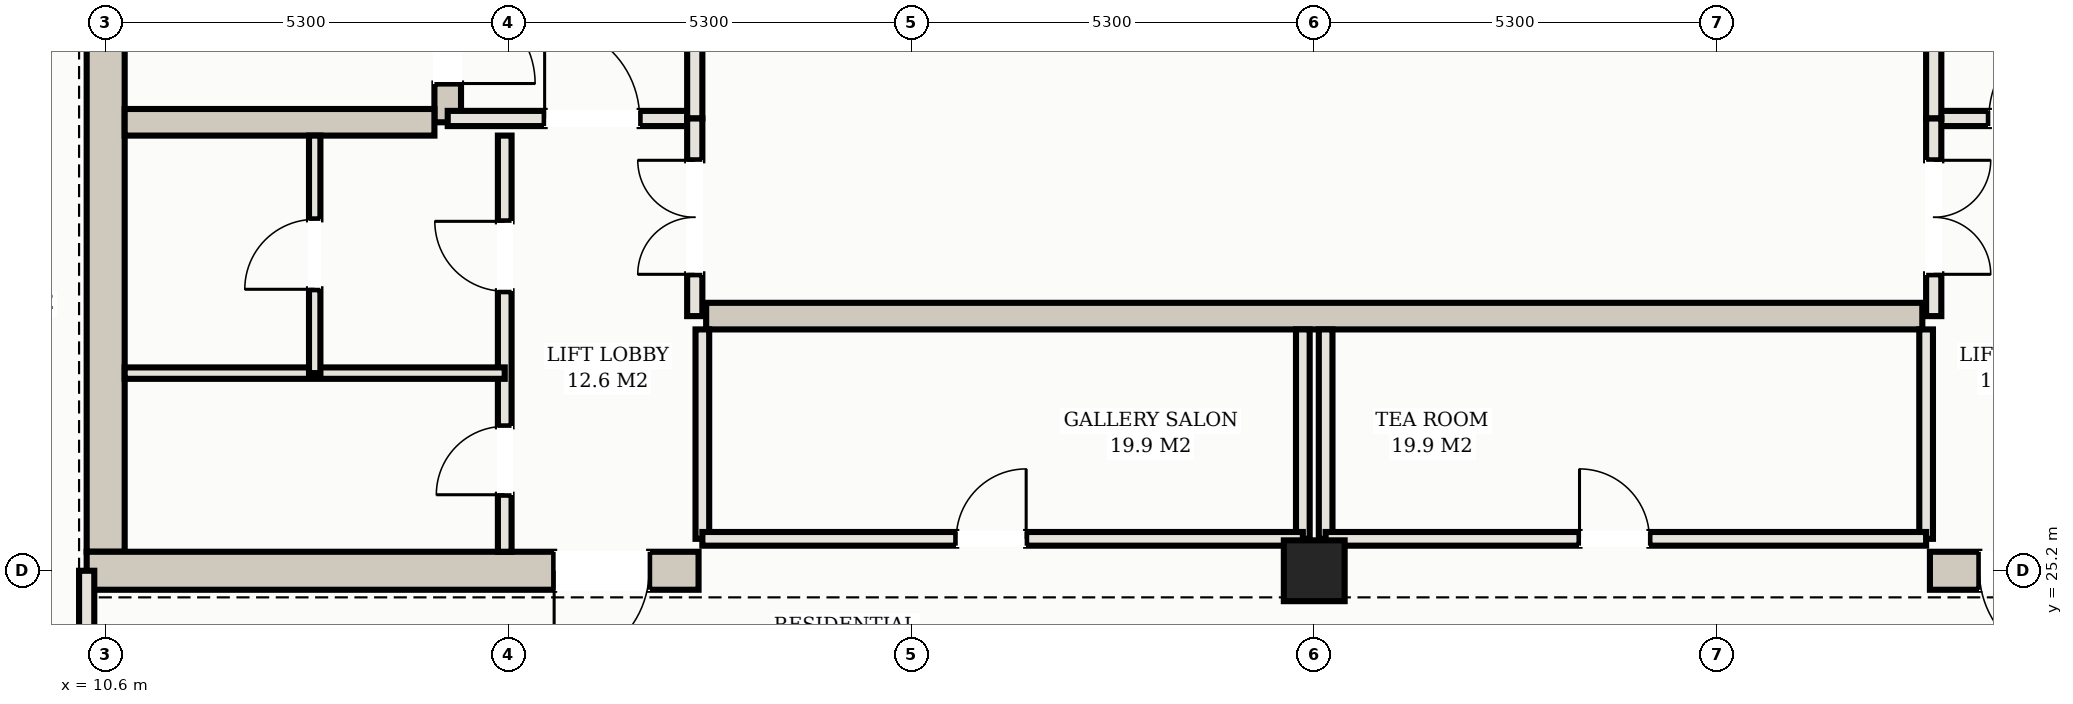
"""IFC4 building model, lengths in metres.
Left out: names, types, materials, properties, quantities, classifications, styles, units other than length and angle.
Written with IfcOpenShell. Run it as: python <this file> out.ifc"""

import sys

from ifc_helpers import new_model, si_unit, direction, frame, frame_2d, origin, origin_2d, place, context, subcontext, project, spatial, rectangle, hollow_rectangle, extrude, element, fill, save


model = new_model("IFC4")
c1 = context("Model", 3, precision=1e-05, world=origin(), true_north=direction((0.0, 1.0)))
c2 = subcontext(c1, "Body", "Model", "MODEL_VIEW")
j1 = project(units=[si_unit("LENGTHUNIT", "METRE"), si_unit("PLANEANGLEUNIT", "RADIAN")], contexts=[c1])
p1 = place(None, origin())
s1 = spatial("IfcSite", under=j1, at=p1, CompositionType="ELEMENT")
p2 = place(p1, origin())
s2 = spatial("IfcBuilding", under=s1, at=p2, CompositionType="ELEMENT")
p3 = place(p2, frame((0.0, 0.0, 200.0)))
s3 = spatial("IfcBuildingStorey", under=s2, at=p3, CompositionType="ELEMENT", Elevation=200.0)
p4 = place(p3, frame((10.6, 25.45, 0.0), z_axis=(0.0, 0.0, 1.0), x_axis=(0.0, 1.0, 0.0)))
e1 = element("IfcWall", 1, at=p4, inside=s3, PredefinedType="SHEAR", context=c2, shape_type="SweptSolid", body=[
    extrude(rectangle(XDim=14.3, YDim=0.5, at=frame_2d((7.15, 0.0))), origin(), (0.0, 0.0, 1.0), 3.11),
])
p5 = place(p3, frame((10.35, 25.2, 0.0), z_axis=(0.0, 0.0, 1.0), x_axis=(1.0, 0.0, 0.0)))
e2 = element("IfcWall", 2, at=p5, inside=s3, PredefinedType="SHEAR", context=c2, shape_type="SweptSolid", body=[
    extrude(rectangle(XDim=8.05, YDim=0.5, at=frame_2d((4.025, 0.0))), origin(), (0.0, 0.0, 1.0), 3.11),
])
p6 = place(p5, frame((6.15, 0.0, 0.0)))
e3 = element("IfcOpeningElement", 3, at=p6, cuts=e2, PredefinedType="OPENING", context=c2, shape_type="SweptSolid", body=[
    extrude(rectangle(XDim=1.25, YDim=2.2, at=frame_2d((0.625, 1.1))), frame((0.0, 0.26, 0.0), z_axis=(0.0, -1.0, 0.0), x_axis=(1.0, 0.0, 0.0)), (0.0, 0.0, 1.0), 0.52),
])
p7 = place(p3, frame((34.6, 25.2, 0.0), z_axis=(0.0, 0.0, 1.0), x_axis=(1.0, 0.0, 0.0)))
e4 = element("IfcWall", 4, at=p7, inside=s3, PredefinedType="SHEAR", context=c2, shape_type="SweptSolid", body=[
    extrude(rectangle(XDim=8.05, YDim=0.5, at=frame_2d((4.025, 0.0))), origin(), (0.0, 0.0, 1.0), 3.11),
])
p8 = place(p7, frame((0.65, 0.0, 0.0)))
e5 = element("IfcOpeningElement", 5, at=p8, cuts=e4, PredefinedType="OPENING", context=c2, shape_type="SweptSolid", body=[
    extrude(rectangle(XDim=1.25, YDim=2.2, at=frame_2d((0.625, 1.1))), frame((0.0, 0.26, 0.0), z_axis=(0.0, -1.0, 0.0), x_axis=(1.0, 0.0, 0.0)), (0.0, 0.0, 1.0), 0.52),
])
p9 = place(p3, frame((15.1, 31.1, 0.0), z_axis=(0.0, 0.0, 1.0), x_axis=(0.0, 1.0, 0.0)))
e6 = element("IfcWall", 6, at=p9, inside=s3, PredefinedType="SHEAR", context=c2, shape_type="SweptSolid", body=[
    extrude(rectangle(XDim=8.65, YDim=0.35, at=frame_2d((4.325, 0.0))), origin(), (0.0, 0.0, 1.0), 3.11),
])
p10 = place(p9, frame((0.51, 0.0, 0.0)))
e7 = element("IfcOpeningElement", 7, at=p10, cuts=e6, PredefinedType="OPENING", context=c2, shape_type="SweptSolid", body=[
    extrude(rectangle(XDim=1.15, YDim=2.2, at=frame_2d((0.575, 1.1))), frame((0.0, 0.185, 0.0), z_axis=(0.0, -1.0, 0.0), x_axis=(1.0, 0.0, 0.0)), (0.0, 0.0, 1.0), 0.37),
])
p11 = place(p3, frame((10.85, 31.1, 0.0), z_axis=(0.0, 0.0, 1.0), x_axis=(1.0, 0.0, 0.0)))
e8 = element("IfcWall", 8, at=p11, inside=s3, PredefinedType="SHEAR", context=c2, shape_type="SweptSolid", body=[
    extrude(rectangle(XDim=4.075, YDim=0.35, at=frame_2d((2.038, 0.0))), origin(), (0.0, 0.0, 1.0), 3.11),
])
p12 = place(p3, frame((18.5, 28.55, 0.0), z_axis=(0.0, 0.0, 1.0), x_axis=(1.0, 0.0, 0.0)))
e9 = element("IfcWall", 9, at=p12, inside=s3, PredefinedType="SHEAR", context=c2, shape_type="SweptSolid", body=[
    extrude(rectangle(XDim=16.0, YDim=0.35, at=frame_2d((8.0, 0.0))), origin(), (0.0, 0.0, 1.0), 3.11),
])
p13 = place(p3, frame((26.5, 25.2, 0.0), z_axis=(0.0, 0.0, 1.0), x_axis=(1.0, 0.0, 0.0)))
e10 = element("IfcColumn", 10, at=p13, inside=s3, PredefinedType="COLUMN", context=c2, shape_type="SweptSolid", body=[
    extrude(hollow_rectangle(XDim=0.8, YDim=0.8, WallThickness=0.028, at=origin_2d()), origin(), (0.0, 0.0, 1.0), 3.3),
])
p14 = place(p3, frame((15.1, 31.15, 0.0), z_axis=(0.0, 0.0, 1.0), x_axis=(1.0, 0.0, 0.0)))
e11 = element("IfcWall", 11, at=p14, inside=s3, PredefinedType="PARTITIONING", context=c2, shape_type="SweptSolid", body=[
    extrude(rectangle(XDim=3.25, YDim=0.2, at=frame_2d((1.625, 0.0))), origin(), (0.0, 0.0, 1.0), 2.43),
])
p15 = place(p14, frame((1.275, 0.0, 0.0)))
e12 = element("IfcOpeningElement", 12, at=p15, cuts=e11, PredefinedType="OPENING", context=c2, shape_type="SweptSolid", body=[
    extrude(rectangle(XDim=1.25, YDim=2.2, at=frame_2d((0.625, 1.1))), frame((0.0, 0.11, 0.0), z_axis=(0.0, -1.0, 0.0), x_axis=(1.0, 0.0, 0.0)), (0.0, 0.0, 1.0), 0.22),
])
p16 = place(p3, frame((18.35, 31.15, 0.0), z_axis=(0.0, 0.0, 1.0), x_axis=(0.0, 1.0, 0.0)))
e13 = element("IfcWall", 13, at=p16, inside=s3, PredefinedType="PARTITIONING", context=c2, shape_type="SweptSolid", body=[
    extrude(rectangle(XDim=5.15, YDim=0.2, at=frame_2d((2.575, 0.0))), origin(), (0.0, 0.0, 1.0), 2.43),
])
p17 = place(p16, frame((1.875, 0.0, 0.0)))
e14 = element("IfcOpeningElement", 14, at=p17, cuts=e13, PredefinedType="OPENING", context=c2, shape_type="SweptSolid", body=[
    extrude(rectangle(XDim=1.25, YDim=2.2, at=frame_2d((0.625, 1.1))), frame((0.0, 0.11, 0.0), z_axis=(0.0, -1.0, 0.0), x_axis=(1.0, 0.0, 0.0)), (0.0, 0.0, 1.0), 0.22),
])
p18 = place(p3, frame((34.65, 31.15, 0.0), z_axis=(0.0, 0.0, 1.0), x_axis=(1.0, 0.0, 0.0)))
e15 = element("IfcWall", 15, at=p18, inside=s3, PredefinedType="PARTITIONING", context=c2, shape_type="SweptSolid", body=[
    extrude(rectangle(XDim=3.25, YDim=0.2, at=frame_2d((1.625, 0.0))), origin(), (0.0, 0.0, 1.0), 2.43),
])
p19 = place(p18, frame((0.725, 0.0, 0.0)))
e16 = element("IfcOpeningElement", 16, at=p19, cuts=e15, PredefinedType="OPENING", context=c2, shape_type="SweptSolid", body=[
    extrude(rectangle(XDim=1.25, YDim=2.2, at=frame_2d((0.625, 1.1))), frame((0.0, 0.11, 0.0), z_axis=(0.0, -1.0, 0.0), x_axis=(1.0, 0.0, 0.0)), (0.0, 0.0, 1.0), 0.22),
])
p20 = place(p3, frame((34.65, 31.15, 0.0), z_axis=(0.0, 0.0, 1.0), x_axis=(0.0, 1.0, 0.0)))
e17 = element("IfcWall", 17, at=p20, inside=s3, PredefinedType="PARTITIONING", context=c2, shape_type="SweptSolid", body=[
    extrude(rectangle(XDim=5.15, YDim=0.2, at=frame_2d((2.575, 0.0))), origin(), (0.0, 0.0, 1.0), 2.43),
])
p21 = place(p20, frame((1.875, 0.0, 0.0)))
e18 = element("IfcOpeningElement", 18, at=p21, cuts=e17, PredefinedType="OPENING", context=c2, shape_type="SweptSolid", body=[
    extrude(rectangle(XDim=1.25, YDim=2.2, at=frame_2d((0.625, 1.1))), frame((0.0, 0.11, 0.0), z_axis=(0.0, -1.0, 0.0), x_axis=(1.0, 0.0, 0.0)), (0.0, 0.0, 1.0), 0.22),
])
p22 = place(p3, frame((15.85, 25.45, 0.0), z_axis=(0.0, 0.0, 1.0), x_axis=(0.0, 1.0, 0.0)))
e19 = element("IfcWall", 19, at=p22, inside=s3, PredefinedType="PARTITIONING", context=c2, shape_type="SweptSolid", body=[
    extrude(rectangle(XDim=5.475, YDim=0.18, at=frame_2d((2.738, 0.0))), origin(), (0.0, 0.0, 1.0), 2.43),
])
p23 = place(p22, frame((0.75, 0.0, 0.0)))
e20 = element("IfcOpeningElement", 20, at=p23, cuts=e19, PredefinedType="OPENING", context=c2, shape_type="SweptSolid", body=[
    extrude(rectangle(XDim=0.9, YDim=2.15, at=frame_2d((0.45, 1.075))), frame((0.0, 0.1, 0.0), z_axis=(0.0, -1.0, 0.0), x_axis=(1.0, 0.0, 0.0)), (0.0, 0.0, 1.0), 0.2),
])
p24 = place(p22, frame((3.427, 0.0, 0.0)))
e21 = element("IfcOpeningElement", 21, at=p24, cuts=e19, PredefinedType="OPENING", context=c2, shape_type="SweptSolid", body=[
    extrude(rectangle(XDim=0.92, YDim=2.15, at=frame_2d((0.46, 1.075))), frame((0.0, 0.1, 0.0), z_axis=(0.0, -1.0, 0.0), x_axis=(1.0, 0.0, 0.0)), (0.0, 0.0, 1.0), 0.2),
])
p25 = place(p3, frame((10.85, 27.8, 0.0), z_axis=(0.0, 0.0, 1.0), x_axis=(1.0, 0.0, 0.0)))
e22 = element("IfcWall", 22, at=p25, inside=s3, PredefinedType="PARTITIONING", context=c2, shape_type="SweptSolid", body=[
    extrude(rectangle(XDim=5.0, YDim=0.15, at=frame_2d((2.5, 0.0))), origin(), (0.0, 0.0, 1.0), 2.43),
])
p26 = place(p3, frame((13.35, 27.8, 0.0), z_axis=(0.0, 0.0, 1.0), x_axis=(0.0, 1.0, 0.0)))
e23 = element("IfcWall", 23, at=p26, inside=s3, PredefinedType="PARTITIONING", context=c2, shape_type="SweptSolid", body=[
    extrude(rectangle(XDim=3.125, YDim=0.15, at=frame_2d((1.562, 0.0))), origin(), (0.0, 0.0, 1.0), 2.43),
])
p27 = place(p26, frame((1.103, 0.0, 0.0)))
e24 = element("IfcOpeningElement", 24, at=p27, cuts=e23, PredefinedType="OPENING", context=c2, shape_type="SweptSolid", body=[
    extrude(rectangle(XDim=0.92, YDim=2.15, at=frame_2d((0.46, 1.075))), frame((0.0, 0.085, 0.0), z_axis=(0.0, -1.0, 0.0), x_axis=(1.0, 0.0, 0.0)), (0.0, 0.0, 1.0), 0.17),
])
p28 = place(p3, frame((18.35, 28.55, 0.0), z_axis=(0.0, 0.0, 1.0), x_axis=(0.0, 1.0, 0.0)))
e25 = element("IfcWall", 25, at=p28, inside=s3, PredefinedType="PARTITIONING", context=c2, shape_type="SweptSolid", body=[
    extrude(rectangle(XDim=2.6, YDim=0.2, at=frame_2d((1.3, 0.0))), origin(), (0.0, 0.0, 1.0), 2.43),
])
p29 = place(p28, frame((0.55, 0.0, 0.0)))
e26 = element("IfcOpeningElement", 26, at=p29, cuts=e25, PredefinedType="OPENING", context=c2, shape_type="SweptSolid", body=[
    extrude(rectangle(XDim=1.5, YDim=2.25, at=frame_2d((0.75, 1.125))), frame((0.0, 0.11, 0.0), z_axis=(0.0, -1.0, 0.0), x_axis=(1.0, 0.0, 0.0)), (0.0, 0.0, 1.0), 0.22),
])
p30 = place(p3, frame((34.65, 28.55, 0.0), z_axis=(0.0, 0.0, 1.0), x_axis=(0.0, 1.0, 0.0)))
e27 = element("IfcWall", 27, at=p30, inside=s3, PredefinedType="PARTITIONING", context=c2, shape_type="SweptSolid", body=[
    extrude(rectangle(XDim=2.6, YDim=0.2, at=frame_2d((1.3, 0.0))), origin(), (0.0, 0.0, 1.0), 2.43),
])
p31 = place(p30, frame((0.55, 0.0, 0.0)))
e28 = element("IfcOpeningElement", 28, at=p31, cuts=e27, PredefinedType="OPENING", context=c2, shape_type="SweptSolid", body=[
    extrude(rectangle(XDim=1.5, YDim=2.25, at=frame_2d((0.75, 1.125))), frame((0.0, 0.11, 0.0), z_axis=(0.0, -1.0, 0.0), x_axis=(1.0, 0.0, 0.0)), (0.0, 0.0, 1.0), 0.22),
])
for number, where, z_axis, x_axis in (
    (29, (18.45, 25.62, 0.0), (0.0, 0.0, 1.0), (0.0, 1.0, 0.0)),
    (30, (26.35, 25.62, 0.0), (0.0, 0.0, 1.0), (0.0, 1.0, 0.0)),
):
    element("IfcWall", number, at=place(p3, frame(where, z_axis=z_axis, x_axis=x_axis)), inside=s3, PredefinedType="PARTITIONING", context=c2, shape_type="SweptSolid", body=[
        extrude(rectangle(XDim=2.755, YDim=0.18, at=frame_2d((1.377, 0.0))), origin(), (0.0, 0.0, 1.0), 2.43),
    ])
p32 = place(p3, frame((18.45, 25.62, 0.0), z_axis=(0.0, 0.0, 1.0), x_axis=(1.0, 0.0, 0.0)))
e31 = element("IfcWall", 31, at=p32, inside=s3, PredefinedType="PARTITIONING", context=c2, shape_type="SweptSolid", body=[
    extrude(rectangle(XDim=7.9, YDim=0.18, at=frame_2d((3.95, 0.0))), origin(), (0.0, 0.0, 1.0), 2.43),
])
p33 = place(p32, frame((3.34, 0.0, 0.0)))
e32 = element("IfcOpeningElement", 32, at=p33, cuts=e31, PredefinedType="OPENING", context=c2, shape_type="SweptSolid", body=[
    extrude(rectangle(XDim=0.92, YDim=2.15, at=frame_2d((0.46, 1.075))), frame((0.0, 0.1, 0.0), z_axis=(0.0, -1.0, 0.0), x_axis=(1.0, 0.0, 0.0)), (0.0, 0.0, 1.0), 0.2),
])
for number, where, z_axis, x_axis in (
    (33, (26.65, 25.62, 0.0), (0.0, 0.0, 1.0), (0.0, 1.0, 0.0)),
    (34, (34.55, 25.62, 0.0), (0.0, 0.0, 1.0), (0.0, 1.0, 0.0)),
):
    element("IfcWall", number, at=place(p3, frame(where, z_axis=z_axis, x_axis=x_axis)), inside=s3, PredefinedType="PARTITIONING", context=c2, shape_type="SweptSolid", body=[
        extrude(rectangle(XDim=2.755, YDim=0.18, at=frame_2d((1.377, 0.0))), origin(), (0.0, 0.0, 1.0), 2.43),
    ])
p34 = place(p3, frame((26.65, 25.62, 0.0), z_axis=(0.0, 0.0, 1.0), x_axis=(1.0, 0.0, 0.0)))
e35 = element("IfcWall", 35, at=p34, inside=s3, PredefinedType="PARTITIONING", context=c2, shape_type="SweptSolid", body=[
    extrude(rectangle(XDim=7.9, YDim=0.18, at=frame_2d((3.95, 0.0))), origin(), (0.0, 0.0, 1.0), 2.43),
])
p35 = place(p34, frame((3.34, 0.0, 0.0)))
e36 = element("IfcOpeningElement", 36, at=p35, cuts=e35, PredefinedType="OPENING", context=c2, shape_type="SweptSolid", body=[
    extrude(rectangle(XDim=0.92, YDim=2.15, at=frame_2d((0.46, 1.075))), frame((0.0, 0.1, 0.0), z_axis=(0.0, -1.0, 0.0), x_axis=(1.0, 0.0, 0.0)), (0.0, 0.0, 1.0), 0.2),
])
p36 = place(p3, frame((10.35, 24.2, 0.0), z_axis=(0.0, 0.0, 1.0), x_axis=(0.0, 1.0, 0.0)))
e37 = element("IfcWall", 37, at=p36, inside=s3, PredefinedType="PARTITIONING", context=c2, shape_type="SweptSolid", body=[
    extrude(rectangle(XDim=1.0, YDim=0.2, at=frame_2d((0.5, 0.0))), origin(), (0.0, 0.0, 1.0), 2.43),
])
p37 = place(p6, frame((1.25, 0.0, 0.0), z_axis=(0.0, 0.0, 1.0), x_axis=(-1.0, 0.0, 0.0)))
e38 = element("IfcDoor", 38, at=p37, inside=s3, OperationType="SINGLE_SWING_RIGHT", PredefinedType="DOOR", context=c2, shape_type="SweptSolid", body=[
    extrude(rectangle(XDim=1.25, YDim=2.2, at=frame_2d((0.625, 1.1))), frame((0.0, 0.025, 0.0), z_axis=(0.0, -1.0, 0.0), x_axis=(1.0, 0.0, 0.0)), (0.0, 0.0, 1.0), 0.05),
])
fill(e3, e38)
p38 = place(p8, frame((1.25, 0.0, 0.0), z_axis=(0.0, 0.0, 1.0), x_axis=(-1.0, 0.0, 0.0)))
e39 = element("IfcDoor", 39, at=p38, inside=s3, OperationType="SINGLE_SWING_LEFT", PredefinedType="DOOR", context=c2, shape_type="SweptSolid", body=[
    extrude(rectangle(XDim=1.25, YDim=2.2, at=frame_2d((0.625, 1.1))), frame((0.0, 0.025, 0.0), z_axis=(0.0, -1.0, 0.0), x_axis=(1.0, 0.0, 0.0)), (0.0, 0.0, 1.0), 0.05),
])
fill(e5, e39)
p39 = place(p15, origin())
e40 = element("IfcDoor", 40, at=p39, inside=s3, OperationType="SINGLE_SWING_LEFT", PredefinedType="DOOR", context=c2, shape_type="SweptSolid", body=[
    extrude(rectangle(XDim=1.25, YDim=2.2, at=frame_2d((0.625, 1.1))), frame((0.0, 0.025, 0.0), z_axis=(0.0, -1.0, 0.0), x_axis=(1.0, 0.0, 0.0)), (0.0, 0.0, 1.0), 0.05),
])
fill(e12, e40)
p40 = place(p19, origin())
e41 = element("IfcDoor", 41, at=p40, inside=s3, OperationType="SINGLE_SWING_RIGHT", PredefinedType="DOOR", context=c2, shape_type="SweptSolid", body=[
    extrude(rectangle(XDim=1.25, YDim=2.2, at=frame_2d((0.625, 1.1))), frame((0.0, 0.025, 0.0), z_axis=(0.0, -1.0, 0.0), x_axis=(1.0, 0.0, 0.0)), (0.0, 0.0, 1.0), 0.05),
])
fill(e16, e41)
p41 = place(p10, frame((1.15, 0.0, 0.0), z_axis=(0.0, 0.0, 1.0), x_axis=(-1.0, 0.0, 0.0)))
e42 = element("IfcDoor", 42, at=p41, inside=s3, OperationType="SINGLE_SWING_RIGHT", PredefinedType="DOOR", context=c2, shape_type="SweptSolid", body=[
    extrude(rectangle(XDim=1.15, YDim=2.2, at=frame_2d((0.575, 1.1))), frame((0.0, 0.025, 0.0), z_axis=(0.0, -1.0, 0.0), x_axis=(1.0, 0.0, 0.0)), (0.0, 0.0, 1.0), 0.05),
])
fill(e7, e42)
p42 = place(p23, origin())
e43 = element("IfcDoor", 43, at=p42, inside=s3, OperationType="SINGLE_SWING_LEFT", PredefinedType="DOOR", context=c2, shape_type="SweptSolid", body=[
    extrude(rectangle(XDim=0.9, YDim=2.15, at=frame_2d((0.45, 1.075))), frame((0.0, 0.025, 0.0), z_axis=(0.0, -1.0, 0.0), x_axis=(1.0, 0.0, 0.0)), (0.0, 0.0, 1.0), 0.05),
])
fill(e20, e43)
p43 = place(p24, origin())
e44 = element("IfcDoor", 44, at=p43, inside=s3, OperationType="SINGLE_SWING_RIGHT", PredefinedType="DOOR", context=c2, shape_type="SweptSolid", body=[
    extrude(rectangle(XDim=0.92, YDim=2.15, at=frame_2d((0.46, 1.075))), frame((0.0, 0.025, 0.0), z_axis=(0.0, -1.0, 0.0), x_axis=(1.0, 0.0, 0.0)), (0.0, 0.0, 1.0), 0.05),
])
fill(e21, e44)
p44 = place(p27, origin())
e45 = element("IfcDoor", 45, at=p44, inside=s3, OperationType="SINGLE_SWING_LEFT", PredefinedType="DOOR", context=c2, shape_type="SweptSolid", body=[
    extrude(rectangle(XDim=0.92, YDim=2.15, at=frame_2d((0.46, 1.075))), frame((0.0, 0.025, 0.0), z_axis=(0.0, -1.0, 0.0), x_axis=(1.0, 0.0, 0.0)), (0.0, 0.0, 1.0), 0.05),
])
fill(e24, e45)
p45 = place(p29, origin())
e46 = element("IfcDoor", 46, at=p45, inside=s3, OperationType="DOUBLE_DOOR_SINGLE_SWING", PredefinedType="DOOR", context=c2, shape_type="SweptSolid", body=[
    extrude(rectangle(XDim=1.5, YDim=2.25, at=frame_2d((0.75, 1.125))), frame((0.0, 0.025, 0.0), z_axis=(0.0, -1.0, 0.0), x_axis=(1.0, 0.0, 0.0)), (0.0, 0.0, 1.0), 0.05),
])
fill(e26, e46)
p46 = place(p31, frame((1.5, 0.0, 0.0), z_axis=(0.0, 0.0, 1.0), x_axis=(-1.0, 0.0, 0.0)))
e47 = element("IfcDoor", 47, at=p46, inside=s3, OperationType="DOUBLE_DOOR_SINGLE_SWING", PredefinedType="DOOR", context=c2, shape_type="SweptSolid", body=[
    extrude(rectangle(XDim=1.5, YDim=2.25, at=frame_2d((0.75, 1.125))), frame((0.0, 0.025, 0.0), z_axis=(0.0, -1.0, 0.0), x_axis=(1.0, 0.0, 0.0)), (0.0, 0.0, 1.0), 0.05),
])
fill(e28, e47)
p47 = place(p33, origin())
e48 = element("IfcDoor", 48, at=p47, inside=s3, OperationType="SINGLE_SWING_RIGHT", PredefinedType="DOOR", context=c2, shape_type="SweptSolid", body=[
    extrude(rectangle(XDim=0.92, YDim=2.15, at=frame_2d((0.46, 1.075))), frame((0.0, 0.025, 0.0), z_axis=(0.0, -1.0, 0.0), x_axis=(1.0, 0.0, 0.0)), (0.0, 0.0, 1.0), 0.05),
])
fill(e32, e48)
p48 = place(p35, origin())
e49 = element("IfcDoor", 49, at=p48, inside=s3, OperationType="SINGLE_SWING_LEFT", PredefinedType="DOOR", context=c2, shape_type="SweptSolid", body=[
    extrude(rectangle(XDim=0.92, YDim=2.15, at=frame_2d((0.46, 1.075))), frame((0.0, 0.025, 0.0), z_axis=(0.0, -1.0, 0.0), x_axis=(1.0, 0.0, 0.0)), (0.0, 0.0, 1.0), 0.05),
])
fill(e36, e49)
save(model, sys.argv[1])
